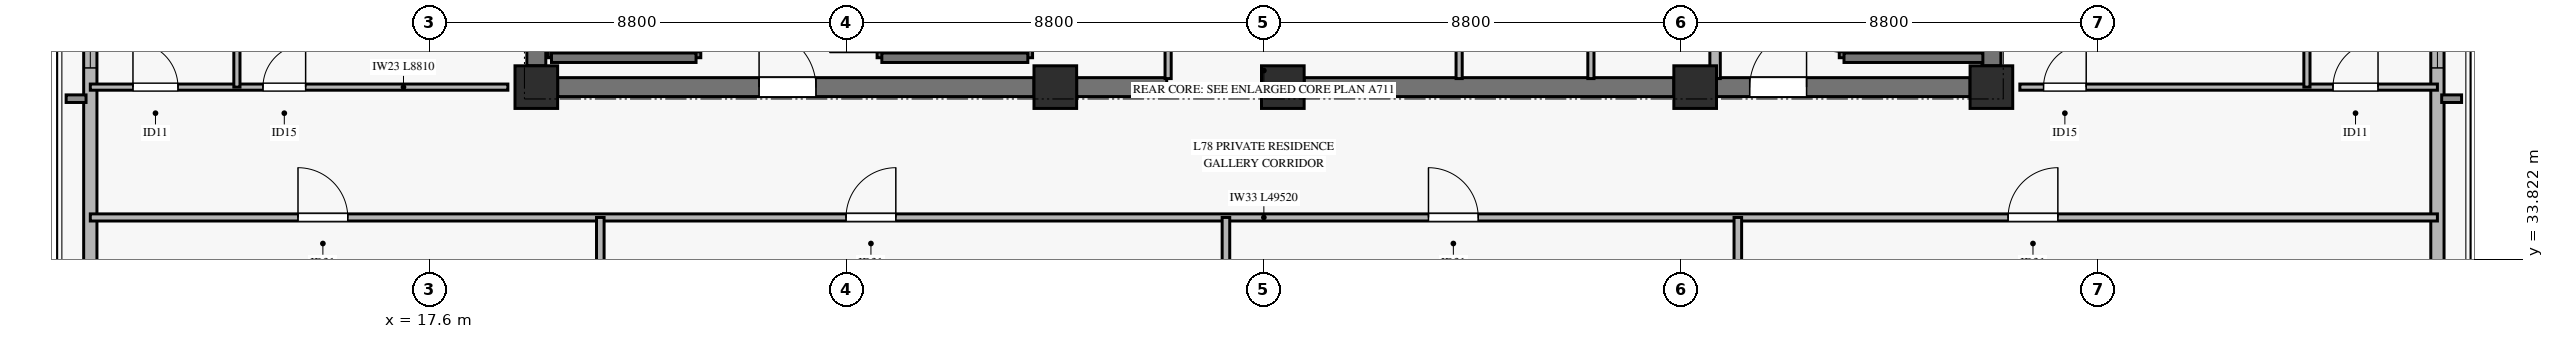
"""IFC4 building model, lengths in metres.
Left out: names, types, materials, properties, quantities, classifications, styles, units other than length and angle.
Written with IfcOpenShell. Run it as: python <this file> out.ifc"""

import sys

from ifc_helpers import new_model, si_unit, direction, frame, frame_2d, origin, origin_2d, place, context, subcontext, project, spatial, rectangle, extrude, source, transform, mapped, element, fill, save


model = new_model("IFC4")
c1 = context("Model", 3, precision=1e-05, world=origin(), true_north=direction((0.0, 1.0)))
c2 = subcontext(c1, "Body", "Model", "MODEL_VIEW")
j1 = project(units=[si_unit("LENGTHUNIT", "METRE"), si_unit("PLANEANGLEUNIT", "RADIAN")], contexts=[c1])
p1 = place(None, origin())
s1 = spatial("IfcSite", under=j1, at=p1, CompositionType="ELEMENT")
p2 = place(p1, origin())
s2 = spatial("IfcBuilding", under=s1, at=p2, CompositionType="ELEMENT")
p3 = place(p2, frame((0.0, 0.0, 304.0)))
s3 = spatial("IfcBuildingStorey", under=s2, at=p3, CompositionType="ELEMENT", Elevation=304.0)
m1 = source(origin(), c2, "Body", "SweptSolid", [
    extrude(rectangle(XDim=0.9, YDim=0.9, at=origin_2d()), origin(), (0.0, 0.0, 1.0), 3.185),
])
for number, where, z_axis, x_axis in (
    (1, (19.85, 37.45, 0.0), (0.0, 0.0, 1.0), (1.0, 0.0, 0.0)),
    (2, (30.8, 37.45, 0.0), (0.0, 0.0, 1.0), (1.0, 0.0, 0.0)),
    (3, (35.6, 37.45, 0.0), (0.0, 0.0, 1.0), (1.0, 0.0, 0.0)),
    (4, (44.3, 37.45, 0.0), (0.0, 0.0, 1.0), (1.0, 0.0, 0.0)),
    (5, (50.55, 37.45, 0.0), (0.0, 0.0, 1.0), (1.0, 0.0, 0.0)),
):
    element("IfcColumn", number, at=place(p3, frame(where, z_axis=z_axis, x_axis=x_axis)), inside=s3, PredefinedType="PILASTER", context=c2, shape_type="MappedRepresentation", body=[
        mapped(m1, transform((0.0, 0.0, 0.0), x_axis=(1.0, 0.0, 0.0), y_axis=(0.0, 1.0, 0.0), z_axis=(0.0, 0.0, 1.0), scale=1.0)),
    ])
p4 = place(p3, frame((20.3, 37.45, 0.0), z_axis=(0.0, 0.0, 1.0), x_axis=(1.0, 0.0, 0.0)))
e6 = element("IfcWall", 6, at=p4, inside=s3, PredefinedType="SHEAR", context=c2, shape_type="SweptSolid", body=[
    extrude(rectangle(XDim=10.05, YDim=0.4, at=frame_2d((5.025, 0.0))), origin(), (0.0, 0.0, 1.0), 3.185),
])
p5 = place(p4, frame((4.25, 0.0, 0.0)))
e7 = element("IfcOpeningElement", 7, at=p5, cuts=e6, PredefinedType="OPENING", context=c2, shape_type="SweptSolid", body=[
    extrude(rectangle(XDim=1.2, YDim=2.15, at=frame_2d((0.6, 1.075))), frame((0.0, 0.21, 0.0), z_axis=(0.0, -1.0, 0.0), x_axis=(1.0, 0.0, 0.0)), (0.0, 0.0, 1.0), 0.42),
])
p6 = place(p3, frame((31.25, 37.45, 0.0), z_axis=(0.0, 0.0, 1.0), x_axis=(1.0, 0.0, 0.0)))
e8 = element("IfcWall", 8, at=p6, inside=s3, PredefinedType="SHEAR", context=c2, shape_type="SweptSolid", body=[
    extrude(rectangle(XDim=1.9, YDim=0.4, at=frame_2d((0.95, 0.0))), origin(), (0.0, 0.0, 1.0), 3.185),
])
p7 = place(p3, frame((36.05, 37.45, 0.0), z_axis=(0.0, 0.0, 1.0), x_axis=(1.0, 0.0, 0.0)))
e9 = element("IfcWall", 9, at=p7, inside=s3, PredefinedType="SHEAR", context=c2, shape_type="SweptSolid", body=[
    extrude(rectangle(XDim=7.8, YDim=0.4, at=frame_2d((3.9, 0.0))), origin(), (0.0, 0.0, 1.0), 3.185),
])
p8 = place(p3, frame((44.75, 37.45, 0.0), z_axis=(0.0, 0.0, 1.0), x_axis=(1.0, 0.0, 0.0)))
e10 = element("IfcWall", 10, at=p8, inside=s3, PredefinedType="SHEAR", context=c2, shape_type="SweptSolid", body=[
    extrude(rectangle(XDim=5.35, YDim=0.4, at=frame_2d((2.675, 0.0))), origin(), (0.0, 0.0, 1.0), 3.185),
])
p9 = place(p8, frame((0.7, 0.0, 0.0)))
e11 = element("IfcOpeningElement", 11, at=p9, cuts=e10, PredefinedType="OPENING", context=c2, shape_type="SweptSolid", body=[
    extrude(rectangle(XDim=1.2, YDim=2.15, at=frame_2d((0.6, 1.075))), frame((0.0, 0.21, 0.0), z_axis=(0.0, -1.0, 0.0), x_axis=(1.0, 0.0, 0.0)), (0.0, 0.0, 1.0), 0.42),
])
for number, where, z_axis, x_axis in (
    (12, (19.85, 37.9, 0.0), (0.0, 0.0, 1.0), (0.0, 1.0, 0.0)),
    (13, (50.55, 37.9, 0.0), (0.0, 0.0, 1.0), (0.0, 1.0, 0.0)),
):
    element("IfcWall", number, at=place(p3, frame(where, z_axis=z_axis, x_axis=x_axis)), inside=s3, PredefinedType="SHEAR", context=c2, shape_type="SweptSolid", body=[
        extrude(rectangle(XDim=8.2, YDim=0.4, at=frame_2d((4.1, 0.0))), origin(), (0.0, 0.0, 1.0), 3.185),
    ])
p10 = place(p3, frame((10.44, 33.136, 0.0), z_axis=(0.0, 0.0, 1.0), x_axis=(0.0, 1.0, 0.0)))
e14 = element("IfcWall", 14, at=p10, inside=s3, PredefinedType="SOLIDWALL", context=c2, shape_type="SweptSolid", body=[
    extrude(rectangle(XDim=10.579, YDim=0.28, at=frame_2d((5.29, 0.0))), origin(), (0.0, 0.0, 1.0), 2.815),
])
p11 = place(p10, frame((4.719, 0.0, 0.45)))
e15 = element("IfcOpeningElement", 15, at=p11, cuts=e14, PredefinedType="OPENING", context=c2, shape_type="SweptSolid", body=[
    extrude(rectangle(XDim=2.2, YDim=2.1, at=frame_2d((1.1, 1.05))), frame((0.0, 0.15, 0.0), z_axis=(0.0, -1.0, 0.0), x_axis=(1.0, 0.0, 0.0)), (0.0, 0.0, 1.0), 0.3),
])
p12 = place(p3, frame((59.96, 33.136, 0.0), z_axis=(0.0, 0.0, 1.0), x_axis=(0.0, 1.0, 0.0)))
e16 = element("IfcWall", 16, at=p12, inside=s3, PredefinedType="SOLIDWALL", context=c2, shape_type="SweptSolid", body=[
    extrude(rectangle(XDim=10.579, YDim=0.28, at=frame_2d((5.29, 0.0))), origin(), (0.0, 0.0, 1.0), 2.815),
])
p13 = place(p12, frame((4.719, 0.0, 0.45)))
e17 = element("IfcOpeningElement", 17, at=p13, cuts=e16, PredefinedType="OPENING", context=c2, shape_type="SweptSolid", body=[
    extrude(rectangle(XDim=2.2, YDim=2.1, at=frame_2d((1.1, 1.05))), frame((0.0, 0.15, 0.0), z_axis=(0.0, -1.0, 0.0), x_axis=(1.0, 0.0, 0.0)), (0.0, 0.0, 1.0), 0.3),
])
p14 = place(p3, frame((20.17, 38.07, 0.0), z_axis=(0.0, 0.0, 1.0), x_axis=(0.0, 1.0, 0.0)))
e18 = element("IfcWall", 18, at=p14, inside=s3, PredefinedType="SOLIDWALL", context=c2, shape_type="SweptSolid", body=[
    extrude(rectangle(XDim=7.25, YDim=0.14, at=frame_2d((3.625, 0.0))), origin(), (0.0, 0.0, 1.0), 3.4),
])
p15 = place(p3, frame((23.22, 38.07, 0.0), z_axis=(0.0, 0.0, 1.0), x_axis=(0.0, 1.0, 0.0)))
e19 = element("IfcWall", 19, at=p15, inside=s3, PredefinedType="SOLIDWALL", context=c2, shape_type="SweptSolid", body=[
    extrude(rectangle(XDim=7.25, YDim=0.2, at=frame_2d((3.625, 0.0))), origin(), (0.0, 0.0, 1.0), 3.4),
])
p16 = place(p15, frame((0.11, 0.0, 0.0)))
e20 = element("IfcOpeningElement", 20, at=p16, cuts=e19, PredefinedType="OPENING", context=c2, shape_type="SweptSolid", body=[
    extrude(rectangle(XDim=1.1, YDim=2.15, at=frame_2d((0.55, 1.075))), frame((0.0, 0.11, 0.0), z_axis=(0.0, -1.0, 0.0), x_axis=(1.0, 0.0, 0.0)), (0.0, 0.0, 1.0), 0.22),
])
p17 = place(p3, frame((20.17, 38.07, 0.0), z_axis=(0.0, 0.0, 1.0), x_axis=(1.0, 0.0, 0.0)))
e21 = element("IfcWall", 21, at=p17, inside=s3, PredefinedType="SOLIDWALL", context=c2, shape_type="SweptSolid", body=[
    extrude(rectangle(XDim=3.05, YDim=0.2, at=frame_2d((1.525, 0.0))), origin(), (0.0, 0.0, 1.0), 3.4),
])
p18 = place(p3, frame((27.14, 38.07, 0.0), z_axis=(0.0, 0.0, 1.0), x_axis=(0.0, 1.0, 0.0)))
e22 = element("IfcWall", 22, at=p18, inside=s3, PredefinedType="SOLIDWALL", context=c2, shape_type="SweptSolid", body=[
    extrude(rectangle(XDim=7.25, YDim=0.2, at=frame_2d((3.625, 0.0))), origin(), (0.0, 0.0, 1.0), 3.4),
])
p19 = place(p18, frame((0.11, 0.0, 0.0)))
e23 = element("IfcOpeningElement", 23, at=p19, cuts=e22, PredefinedType="OPENING", context=c2, shape_type="SweptSolid", body=[
    extrude(rectangle(XDim=1.1, YDim=2.15, at=frame_2d((0.55, 1.075))), frame((0.0, 0.11, 0.0), z_axis=(0.0, -1.0, 0.0), x_axis=(1.0, 0.0, 0.0)), (0.0, 0.0, 1.0), 0.22),
])
p20 = place(p3, frame((30.22, 38.07, 0.0), z_axis=(0.0, 0.0, 1.0), x_axis=(0.0, 1.0, 0.0)))
e24 = element("IfcWall", 24, at=p20, inside=s3, PredefinedType="SOLIDWALL", context=c2, shape_type="SweptSolid", body=[
    extrude(rectangle(XDim=7.25, YDim=0.2, at=frame_2d((3.625, 0.0))), origin(), (0.0, 0.0, 1.0), 3.4),
])
p21 = place(p3, frame((27.14, 38.07, 0.0), z_axis=(0.0, 0.0, 1.0), x_axis=(1.0, 0.0, 0.0)))
e25 = element("IfcWall", 25, at=p21, inside=s3, PredefinedType="SOLIDWALL", context=c2, shape_type="SweptSolid", body=[
    extrude(rectangle(XDim=3.08, YDim=0.2, at=frame_2d((1.54, 0.0))), origin(), (0.0, 0.0, 1.0), 3.4),
])
p22 = place(p3, frame((47.44, 38.07, 0.0), z_axis=(0.0, 0.0, 1.0), x_axis=(0.0, 1.0, 0.0)))
e26 = element("IfcWall", 26, at=p22, inside=s3, PredefinedType="SOLIDWALL", context=c2, shape_type="SweptSolid", body=[
    extrude(rectangle(XDim=7.25, YDim=0.2, at=frame_2d((3.625, 0.0))), origin(), (0.0, 0.0, 1.0), 3.4),
])
p23 = place(p22, frame((0.11, 0.0, 0.0)))
e27 = element("IfcOpeningElement", 27, at=p23, cuts=e26, PredefinedType="OPENING", context=c2, shape_type="SweptSolid", body=[
    extrude(rectangle(XDim=1.1, YDim=2.15, at=frame_2d((0.55, 1.075))), frame((0.0, 0.11, 0.0), z_axis=(0.0, -1.0, 0.0), x_axis=(1.0, 0.0, 0.0)), (0.0, 0.0, 1.0), 0.22),
])
p24 = place(p3, frame((47.44, 38.07, 0.0), z_axis=(0.0, 0.0, 1.0), x_axis=(1.0, 0.0, 0.0)))
e28 = element("IfcWall", 28, at=p24, inside=s3, PredefinedType="SOLIDWALL", context=c2, shape_type="SweptSolid", body=[
    extrude(rectangle(XDim=2.93, YDim=0.2, at=frame_2d((1.465, 0.0))), origin(), (0.0, 0.0, 1.0), 3.4),
])
p25 = place(p3, frame((44.72, 37.63, 0.0), z_axis=(0.0, 0.0, 1.0), x_axis=(0.0, 1.0, 0.0)))
e29 = element("IfcWall", 29, at=p25, inside=s3, PredefinedType="SOLIDWALL", context=c2, shape_type="SweptSolid", body=[
    extrude(rectangle(XDim=7.59, YDim=0.22, at=frame_2d((3.795, 0.0))), origin(), (0.0, 0.0, 1.0), 3.185),
])
p26 = place(p3, frame((33.18, 37.63, 0.0), z_axis=(0.0, 0.0, 1.0), x_axis=(0.0, 1.0, 0.0)))
e30 = element("IfcWall", 30, at=p26, inside=s3, PredefinedType="PARTITIONING", context=c2, shape_type="SweptSolid", body=[
    extrude(rectangle(XDim=6.52, YDim=0.13, at=frame_2d((3.26, 0.0))), origin(), (0.0, 0.0, 1.0), 2.27),
])
p27 = place(p26, frame((0.97, 0.0, 0.0)))
e31 = element("IfcOpeningElement", 31, at=p27, cuts=e30, PredefinedType="OPENING", context=c2, shape_type="SweptSolid", body=[
    extrude(rectangle(XDim=0.9, YDim=2.1, at=frame_2d((0.45, 1.05))), frame((0.0, 0.075, 0.0), z_axis=(0.0, -1.0, 0.0), x_axis=(1.0, 0.0, 0.0)), (0.0, 0.0, 1.0), 0.15),
])
p28 = place(p26, frame((3.87, 0.0, 0.0)))
e32 = element("IfcOpeningElement", 32, at=p28, cuts=e30, PredefinedType="OPENING", context=c2, shape_type="SweptSolid", body=[
    extrude(rectangle(XDim=0.9, YDim=2.1, at=frame_2d((0.45, 1.05))), frame((0.0, 0.075, 0.0), z_axis=(0.0, -1.0, 0.0), x_axis=(1.0, 0.0, 0.0)), (0.0, 0.0, 1.0), 0.15),
])
p29 = place(p3, frame((39.32, 37.63, 0.0), z_axis=(0.0, 0.0, 1.0), x_axis=(0.0, 1.0, 0.0)))
e33 = element("IfcWall", 33, at=p29, inside=s3, PredefinedType="PARTITIONING", context=c2, shape_type="SweptSolid", body=[
    extrude(rectangle(XDim=8.74, YDim=0.13, at=frame_2d((4.37, 0.0))), origin(), (0.0, 0.0, 1.0), 3.185),
])
p30 = place(p29, frame((4.89, 0.0, 0.0)))
e34 = element("IfcOpeningElement", 34, at=p30, cuts=e33, PredefinedType="OPENING", context=c2, shape_type="SweptSolid", body=[
    extrude(rectangle(XDim=0.9, YDim=2.1, at=frame_2d((0.45, 1.05))), frame((0.0, 0.075, 0.0), z_axis=(0.0, -1.0, 0.0), x_axis=(1.0, 0.0, 0.0)), (0.0, 0.0, 1.0), 0.15),
])
p31 = place(p3, frame((42.1, 37.63, 0.0), z_axis=(0.0, 0.0, 1.0), x_axis=(0.0, 1.0, 0.0)))
e35 = element("IfcWall", 35, at=p31, inside=s3, PredefinedType="PARTITIONING", context=c2, shape_type="SweptSolid", body=[
    extrude(rectangle(XDim=8.74, YDim=0.13, at=frame_2d((4.37, 0.0))), origin(), (0.0, 0.0, 1.0), 3.185),
])
p32 = place(p31, frame((2.17, 0.0, 0.0)))
e36 = element("IfcOpeningElement", 36, at=p32, cuts=e35, PredefinedType="OPENING", context=c2, shape_type="SweptSolid", body=[
    extrude(rectangle(XDim=0.9, YDim=2.1, at=frame_2d((0.45, 1.05))), frame((0.0, 0.075, 0.0), z_axis=(0.0, -1.0, 0.0), x_axis=(1.0, 0.0, 0.0)), (0.0, 0.0, 1.0), 0.15),
])
p33 = place(p3, frame((10.44, 34.7, 0.0), z_axis=(0.0, 0.0, 1.0), x_axis=(1.0, 0.0, 0.0)))
e37 = element("IfcWall", 37, at=p33, inside=s3, PredefinedType="PARTITIONING", context=c2, shape_type="SweptSolid", body=[
    extrude(rectangle(XDim=49.52, YDim=0.15, at=frame_2d((24.76, 0.0))), origin(), (0.0, 0.0, 1.0), 2.47),
])
p34 = place(p33, frame((4.382, 0.0, 0.0)))
e38 = element("IfcOpeningElement", 38, at=p34, cuts=e37, PredefinedType="OPENING", context=c2, shape_type="SweptSolid", body=[
    extrude(rectangle(XDim=1.05, YDim=2.15, at=frame_2d((0.525, 1.075))), frame((0.0, 0.085, 0.0), z_axis=(0.0, -1.0, 0.0), x_axis=(1.0, 0.0, 0.0)), (0.0, 0.0, 1.0), 0.17),
])
p35 = place(p33, frame((15.945, 0.0, 0.0)))
e39 = element("IfcOpeningElement", 39, at=p35, cuts=e37, PredefinedType="OPENING", context=c2, shape_type="SweptSolid", body=[
    extrude(rectangle(XDim=1.05, YDim=2.15, at=frame_2d((0.525, 1.075))), frame((0.0, 0.085, 0.0), z_axis=(0.0, -1.0, 0.0), x_axis=(1.0, 0.0, 0.0)), (0.0, 0.0, 1.0), 0.17),
])
p36 = place(p33, frame((28.233, 0.0, 0.0)))
e40 = element("IfcOpeningElement", 40, at=p36, cuts=e37, PredefinedType="OPENING", context=c2, shape_type="SweptSolid", body=[
    extrude(rectangle(XDim=1.05, YDim=2.15, at=frame_2d((0.525, 1.075))), frame((0.0, 0.085, 0.0), z_axis=(0.0, -1.0, 0.0), x_axis=(1.0, 0.0, 0.0)), (0.0, 0.0, 1.0), 0.17),
])
p37 = place(p33, frame((40.462, 0.0, 0.0)))
e41 = element("IfcOpeningElement", 41, at=p37, cuts=e37, PredefinedType="OPENING", context=c2, shape_type="SweptSolid", body=[
    extrude(rectangle(XDim=1.05, YDim=2.15, at=frame_2d((0.525, 1.075))), frame((0.0, 0.085, 0.0), z_axis=(0.0, -1.0, 0.0), x_axis=(1.0, 0.0, 0.0)), (0.0, 0.0, 1.0), 0.17),
])
for number, where, z_axis, x_axis in (
    (42, (21.2, 19.772, 0.0), (0.0, 0.0, 1.0), (0.0, 1.0, 0.0)),
    (43, (34.4, 19.772, 0.0), (0.0, 0.0, 1.0), (0.0, 1.0, 0.0)),
    (44, (45.2, 19.772, 0.0), (0.0, 0.0, 1.0), (0.0, 1.0, 0.0)),
):
    element("IfcWall", number, at=place(p3, frame(where, z_axis=z_axis, x_axis=x_axis)), inside=s3, PredefinedType="PARTITIONING", context=c2, shape_type="SweptSolid", body=[
        extrude(rectangle(XDim=14.928, YDim=0.16, at=frame_2d((7.464, 0.0))), origin(), (0.0, 0.0, 1.0), 2.77),
    ])
p38 = place(p3, frame((10.44, 37.45, 0.0), z_axis=(0.0, 0.0, 1.0), x_axis=(1.0, 0.0, 0.0)))
e45 = element("IfcWall", 45, at=p38, inside=s3, PredefinedType="PARTITIONING", context=c2, shape_type="SweptSolid", body=[
    extrude(rectangle(XDim=8.81, YDim=0.13, at=frame_2d((4.405, 0.0))), origin(), (0.0, 0.0, 1.0), 2.82),
])
p39 = place(p38, frame((0.9, 0.0, 0.0)))
e46 = element("IfcOpeningElement", 46, at=p39, cuts=e45, PredefinedType="OPENING", context=c2, shape_type="SweptSolid", body=[
    extrude(rectangle(XDim=0.95, YDim=2.1, at=frame_2d((0.475, 1.05))), frame((0.0, 0.075, 0.0), z_axis=(0.0, -1.0, 0.0), x_axis=(1.0, 0.0, 0.0)), (0.0, 0.0, 1.0), 0.15),
])
p40 = place(p38, frame((3.643, 0.0, 0.0)))
e47 = element("IfcOpeningElement", 47, at=p40, cuts=e45, PredefinedType="OPENING", context=c2, shape_type="SweptSolid", body=[
    extrude(rectangle(XDim=0.9, YDim=2.1, at=frame_2d((0.45, 1.05))), frame((0.0, 0.075, 0.0), z_axis=(0.0, -1.0, 0.0), x_axis=(1.0, 0.0, 0.0)), (0.0, 0.0, 1.0), 0.15),
])
p41 = place(p3, frame((13.533, 37.45, 0.0), z_axis=(0.0, 0.0, 1.0), x_axis=(0.0, 1.0, 0.0)))
e48 = element("IfcWall", 48, at=p41, inside=s3, PredefinedType="PARTITIONING", context=c2, shape_type="SweptSolid", body=[
    extrude(rectangle(XDim=8.8, YDim=0.13, at=frame_2d((4.4, 0.0))), origin(), (0.0, 0.0, 1.0), 3.185),
])
p42 = place(p3, frame((51.15, 37.45, 0.0), z_axis=(0.0, 0.0, 1.0), x_axis=(1.0, 0.0, 0.0)))
e49 = element("IfcWall", 49, at=p42, inside=s3, PredefinedType="PARTITIONING", context=c2, shape_type="SweptSolid", body=[
    extrude(rectangle(XDim=8.81, YDim=0.13, at=frame_2d((4.405, 0.0))), origin(), (0.0, 0.0, 1.0), 2.82),
])
p43 = place(p42, frame((0.5, 0.0, 0.0)))
e50 = element("IfcOpeningElement", 50, at=p43, cuts=e49, PredefinedType="OPENING", context=c2, shape_type="SweptSolid", body=[
    extrude(rectangle(XDim=0.9, YDim=2.1, at=frame_2d((0.45, 1.05))), frame((0.0, 0.075, 0.0), z_axis=(0.0, -1.0, 0.0), x_axis=(1.0, 0.0, 0.0)), (0.0, 0.0, 1.0), 0.15),
])
p44 = place(p42, frame((6.607, 0.0, 0.0)))
e51 = element("IfcOpeningElement", 51, at=p44, cuts=e49, PredefinedType="OPENING", context=c2, shape_type="SweptSolid", body=[
    extrude(rectangle(XDim=0.95, YDim=2.1, at=frame_2d((0.475, 1.05))), frame((0.0, 0.075, 0.0), z_axis=(0.0, -1.0, 0.0), x_axis=(1.0, 0.0, 0.0)), (0.0, 0.0, 1.0), 0.15),
])
p45 = place(p3, frame((57.207, 37.45, 0.0), z_axis=(0.0, 0.0, 1.0), x_axis=(0.0, 1.0, 0.0)))
e52 = element("IfcWall", 52, at=p45, inside=s3, PredefinedType="PARTITIONING", context=c2, shape_type="SweptSolid", body=[
    extrude(rectangle(XDim=8.8, YDim=0.13, at=frame_2d((4.4, 0.0))), origin(), (0.0, 0.0, 1.0), 2.82),
])
m2 = source(origin(), c2, "Body", "SweptSolid", [
    extrude(rectangle(XDim=2.2, YDim=2.1, at=frame_2d((1.1, 1.05))), frame((0.0, 0.03, 0.0), z_axis=(0.0, -1.0, 0.0), x_axis=(1.0, 0.0, 0.0)), (0.0, 0.0, 1.0), 0.06),
])
p46 = place(p11, origin())
e53 = element("IfcWindow", 53, at=p46, inside=s3, PartitioningType="SINGLE_PANEL", PredefinedType="WINDOW", context=c2, shape_type="MappedRepresentation", body=[
    mapped(m2, transform((0.0, 0.0, 0.0), x_axis=(1.0, 0.0, 0.0), y_axis=(0.0, 1.0, 0.0), z_axis=(0.0, 0.0, 1.0), scale=1.0)),
])
fill(e15, e53)
p47 = place(p13, origin())
e54 = element("IfcWindow", 54, at=p47, inside=s3, PartitioningType="SINGLE_PANEL", PredefinedType="WINDOW", context=c2, shape_type="MappedRepresentation", body=[
    mapped(m2, transform((0.0, 0.0, 0.0), x_axis=(1.0, 0.0, 0.0), y_axis=(0.0, 1.0, 0.0), z_axis=(0.0, 0.0, 1.0), scale=1.0)),
])
fill(e17, e54)
m3 = source(origin(), c2, "Body", "SweptSolid", [
    extrude(rectangle(XDim=1.2, YDim=2.15, at=frame_2d((0.6, 1.075))), frame((0.0, 0.025, 0.0), z_axis=(0.0, -1.0, 0.0), x_axis=(1.0, 0.0, 0.0)), (0.0, 0.0, 1.0), 0.05),
])
p48 = place(p5, origin())
e55 = element("IfcDoor", 55, at=p48, inside=s3, OperationType="SINGLE_SWING_LEFT", PredefinedType="DOOR", context=c2, shape_type="MappedRepresentation", body=[
    mapped(m3, transform((0.0, 0.0, 0.0), x_axis=(1.0, 0.0, 0.0), y_axis=(0.0, 1.0, 0.0), z_axis=(0.0, 0.0, 1.0), scale=1.0)),
])
fill(e7, e55)
p49 = place(p9, origin())
e56 = element("IfcDoor", 56, at=p49, inside=s3, OperationType="SINGLE_SWING_RIGHT", PredefinedType="DOOR", context=c2, shape_type="MappedRepresentation", body=[
    mapped(m3, transform((0.0, 0.0, 0.0), x_axis=(1.0, 0.0, 0.0), y_axis=(0.0, 1.0, 0.0), z_axis=(0.0, 0.0, 1.0), scale=1.0)),
])
fill(e11, e56)
m4 = source(origin(), c2, "Body", "SweptSolid", [
    extrude(rectangle(XDim=1.05, YDim=2.15, at=frame_2d((0.525, 1.075))), frame((0.0, 0.025, 0.0), z_axis=(0.0, -1.0, 0.0), x_axis=(1.0, 0.0, 0.0)), (0.0, 0.0, 1.0), 0.05),
])
p50 = place(p34, origin())
e57 = element("IfcDoor", 57, at=p50, inside=s3, OperationType="SINGLE_SWING_LEFT", PredefinedType="DOOR", context=c2, shape_type="MappedRepresentation", body=[
    mapped(m4, transform((0.0, 0.0, 0.0), x_axis=(1.0, 0.0, 0.0), y_axis=(0.0, 1.0, 0.0), z_axis=(0.0, 0.0, 1.0), scale=1.0)),
])
fill(e38, e57)
p51 = place(p35, origin())
e58 = element("IfcDoor", 58, at=p51, inside=s3, OperationType="SINGLE_SWING_RIGHT", PredefinedType="DOOR", context=c2, shape_type="MappedRepresentation", body=[
    mapped(m4, transform((0.0, 0.0, 0.0), x_axis=(1.0, 0.0, 0.0), y_axis=(0.0, 1.0, 0.0), z_axis=(0.0, 0.0, 1.0), scale=1.0)),
])
fill(e39, e58)
p52 = place(p36, origin())
e59 = element("IfcDoor", 59, at=p52, inside=s3, OperationType="SINGLE_SWING_LEFT", PredefinedType="DOOR", context=c2, shape_type="MappedRepresentation", body=[
    mapped(m4, transform((0.0, 0.0, 0.0), x_axis=(1.0, 0.0, 0.0), y_axis=(0.0, 1.0, 0.0), z_axis=(0.0, 0.0, 1.0), scale=1.0)),
])
fill(e40, e59)
p53 = place(p37, origin())
e60 = element("IfcDoor", 60, at=p53, inside=s3, OperationType="SINGLE_SWING_RIGHT", PredefinedType="DOOR", context=c2, shape_type="MappedRepresentation", body=[
    mapped(m4, transform((0.0, 0.0, 0.0), x_axis=(1.0, 0.0, 0.0), y_axis=(0.0, 1.0, 0.0), z_axis=(0.0, 0.0, 1.0), scale=1.0)),
])
fill(e41, e60)
m5 = source(origin(), c2, "Body", "SweptSolid", [
    extrude(rectangle(XDim=0.95, YDim=2.1, at=frame_2d((0.475, 1.05))), frame((0.0, 0.025, 0.0), z_axis=(0.0, -1.0, 0.0), x_axis=(1.0, 0.0, 0.0)), (0.0, 0.0, 1.0), 0.05),
])
p54 = place(p39, origin())
e61 = element("IfcDoor", 61, at=p54, inside=s3, OperationType="SINGLE_SWING_LEFT", PredefinedType="DOOR", context=c2, shape_type="MappedRepresentation", body=[
    mapped(m5, transform((0.0, 0.0, 0.0), x_axis=(1.0, 0.0, 0.0), y_axis=(0.0, 1.0, 0.0), z_axis=(0.0, 0.0, 1.0), scale=1.0)),
])
fill(e46, e61)
m6 = source(origin(), c2, "Body", "SweptSolid", [
    extrude(rectangle(XDim=0.9, YDim=2.1, at=frame_2d((0.45, 1.05))), frame((0.0, 0.025, 0.0), z_axis=(0.0, -1.0, 0.0), x_axis=(1.0, 0.0, 0.0)), (0.0, 0.0, 1.0), 0.05),
])
p55 = place(p40, origin())
e62 = element("IfcDoor", 62, at=p55, inside=s3, OperationType="SINGLE_SWING_RIGHT", PredefinedType="DOOR", context=c2, shape_type="MappedRepresentation", body=[
    mapped(m6, transform((0.0, 0.0, 0.0), x_axis=(1.0, 0.0, 0.0), y_axis=(0.0, 1.0, 0.0), z_axis=(0.0, 0.0, 1.0), scale=1.0)),
])
fill(e47, e62)
p56 = place(p43, origin())
e63 = element("IfcDoor", 63, at=p56, inside=s3, OperationType="SINGLE_SWING_RIGHT", PredefinedType="DOOR", context=c2, shape_type="MappedRepresentation", body=[
    mapped(m6, transform((0.0, 0.0, 0.0), x_axis=(1.0, 0.0, 0.0), y_axis=(0.0, 1.0, 0.0), z_axis=(0.0, 0.0, 1.0), scale=1.0)),
])
fill(e50, e63)
p57 = place(p44, origin())
e64 = element("IfcDoor", 64, at=p57, inside=s3, OperationType="SINGLE_SWING_RIGHT", PredefinedType="DOOR", context=c2, shape_type="MappedRepresentation", body=[
    mapped(m5, transform((0.0, 0.0, 0.0), x_axis=(1.0, 0.0, 0.0), y_axis=(0.0, 1.0, 0.0), z_axis=(0.0, 0.0, 1.0), scale=1.0)),
])
fill(e51, e64)
save(model, sys.argv[1])
